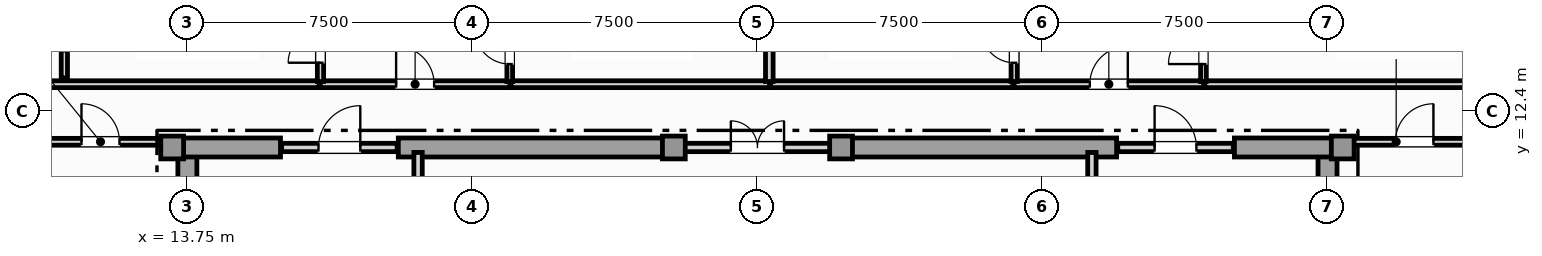
"""IFC4 building model, lengths in metres.
Left out: names, types, materials, properties, quantities, classifications, styles, units other than length and angle.
Written with IfcOpenShell. Run it as: python <this file> out.ifc"""

import sys

from ifc_helpers import new_model, si_unit, direction, frame, frame_2d, origin, origin_2d, place, context, subcontext, project, spatial, rectangle, extrude, element, fill, save


model = new_model("IFC4")
c1 = context("Model", 3, precision=1e-05, world=origin(), true_north=direction((0.0, 1.0)))
c2 = subcontext(c1, "Body", "Model", "MODEL_VIEW")
j1 = project(units=[si_unit("LENGTHUNIT", "METRE"), si_unit("PLANEANGLEUNIT", "RADIAN")], contexts=[c1])
p1 = place(None, origin())
s1 = spatial("IfcSite", under=j1, at=p1, CompositionType="ELEMENT")
p2 = place(p1, origin())
s2 = spatial("IfcBuilding", under=s1, at=p2, CompositionType="ELEMENT")
p3 = place(p2, frame((0.0, 0.0, 353.45)))
s3 = spatial("IfcBuildingStorey", under=s2, at=p3, CompositionType="ELEMENT", Elevation=353.45)
for number, where, z_axis, x_axis in (
    (1, (13.75, 0.92, 0.0), (0.0, 0.0, 1.0), (0.0, 1.0, 0.0)),
    (2, (43.75, 0.92, 0.0), (0.0, 0.0, 1.0), (0.0, 1.0, 0.0)),
):
    element("IfcWall", number, at=place(p3, frame(where, z_axis=z_axis, x_axis=x_axis)), inside=s3, PredefinedType="SHEAR", context=c2, shape_type="SweptSolid", body=[
        extrude(rectangle(XDim=10.53, YDim=0.5, at=frame_2d((5.265, 0.0))), origin(), (0.0, 0.0, 1.0), 4.14),
    ])
p4 = place(p3, frame((13.25, 11.45, 0.0), z_axis=(0.0, 0.0, 1.0), x_axis=(1.0, 0.0, 0.0)))
e3 = element("IfcWall", 3, at=p4, inside=s3, PredefinedType="SHEAR", context=c2, shape_type="SweptSolid", body=[
    extrude(rectangle(XDim=2.95, YDim=0.5, at=frame_2d((1.475, 0.0))), origin(), (0.0, 0.0, 1.0), 4.14),
])
for number, where, z_axis, x_axis in (
    (4, (19.3, 11.45, 0.0), (0.0, 0.0, 1.0), (1.0, 0.0, 0.0)),
    (5, (30.9, 11.45, 0.0), (0.0, 0.0, 1.0), (1.0, 0.0, 0.0)),
):
    element("IfcWall", number, at=place(p3, frame(where, z_axis=z_axis, x_axis=x_axis)), inside=s3, PredefinedType="SHEAR", context=c2, shape_type="SweptSolid", body=[
        extrude(rectangle(XDim=7.3, YDim=0.5, at=frame_2d((3.65, 0.0))), origin(), (0.0, 0.0, 1.0), 4.14),
    ])
p5 = place(p3, frame((41.3, 11.45, 0.0), z_axis=(0.0, 0.0, 1.0), x_axis=(1.0, 0.0, 0.0)))
e6 = element("IfcWall", 6, at=p5, inside=s3, PredefinedType="SHEAR", context=c2, shape_type="SweptSolid", body=[
    extrude(rectangle(XDim=2.95, YDim=0.5, at=frame_2d((1.475, 0.0))), origin(), (0.0, 0.0, 1.0), 4.14),
])
for number, where, z_axis, x_axis in (
    (7, (13.35, 11.45, 0.0), (0.0, 0.0, 1.0), (1.0, 0.0, 0.0)),
    (8, (44.15, 11.45, 0.0), (0.0, 0.0, 1.0), (1.0, 0.0, 0.0)),
    (9, (26.55, 11.45, 0.0), (0.0, 0.0, 1.0), (1.0, 0.0, 0.0)),
    (10, (30.95, 11.45, 0.0), (0.0, 0.0, 1.0), (1.0, 0.0, 0.0)),
):
    element("IfcColumn", number, at=place(p3, frame(where, z_axis=z_axis, x_axis=x_axis)), inside=s3, PredefinedType="COLUMN", context=c2, shape_type="SweptSolid", body=[
        extrude(rectangle(XDim=0.6, YDim=0.6, at=origin_2d()), origin(), (0.0, 0.0, 1.0), 4.4),
    ])
p6 = place(p3, frame((19.82, 8.52, 0.0), z_axis=(0.0, 0.0, 1.0), x_axis=(0.0, 1.0, 0.0)))
e11 = element("IfcWall", 11, at=p6, inside=s3, PredefinedType="SOLIDWALL", context=c2, shape_type="SweptSolid", body=[
    extrude(rectangle(XDim=2.8, YDim=0.22, at=frame_2d((1.4, 0.0))), origin(), (0.0, 0.0, 1.0), 3.595),
])
p7 = place(p6, frame((0.85, 0.0, 0.0)))
e12 = element("IfcOpeningElement", 12, at=p7, cuts=e11, PredefinedType="OPENING", context=c2, shape_type="SweptSolid", body=[
    extrude(rectangle(XDim=1.1, YDim=2.2, at=frame_2d((0.55, 1.1))), frame((0.0, 0.12, 0.0), z_axis=(0.0, -1.0, 0.0), x_axis=(1.0, 0.0, 0.0)), (0.0, 0.0, 1.0), 0.24),
])
p8 = place(p3, frame((37.55, 8.52, 0.0), z_axis=(0.0, 0.0, 1.0), x_axis=(0.0, 1.0, 0.0)))
e13 = element("IfcWall", 13, at=p8, inside=s3, PredefinedType="SOLIDWALL", context=c2, shape_type="SweptSolid", body=[
    extrude(rectangle(XDim=2.8, YDim=0.22, at=frame_2d((1.4, 0.0))), origin(), (0.0, 0.0, 1.0), 3.595),
])
p9 = place(p8, frame((0.85, 0.0, 0.0)))
e14 = element("IfcOpeningElement", 14, at=p9, cuts=e13, PredefinedType="OPENING", context=c2, shape_type="SweptSolid", body=[
    extrude(rectangle(XDim=1.1, YDim=2.2, at=frame_2d((0.55, 1.1))), frame((0.0, 0.12, 0.0), z_axis=(0.0, -1.0, 0.0), x_axis=(1.0, 0.0, 0.0)), (0.0, 0.0, 1.0), 0.24),
])
p10 = place(p3, frame((16.23, 11.45, 0.0), z_axis=(0.0, 0.0, 1.0), x_axis=(1.0, 0.0, 0.0)))
e15 = element("IfcWall", 15, at=p10, inside=s3, PredefinedType="SOLIDWALL", context=c2, shape_type="SweptSolid", body=[
    extrude(rectangle(XDim=3.04, YDim=0.22, at=frame_2d((1.52, 0.0))), origin(), (0.0, 0.0, 1.0), 4.14),
])
p11 = place(p10, frame((0.97, 0.0, 0.0)))
e16 = element("IfcOpeningElement", 16, at=p11, cuts=e15, PredefinedType="OPENING", context=c2, shape_type="SweptSolid", body=[
    extrude(rectangle(XDim=1.1, YDim=2.2, at=frame_2d((0.55, 1.1))), frame((0.0, 0.12, 0.0), z_axis=(0.0, -1.0, 0.0), x_axis=(1.0, 0.0, 0.0)), (0.0, 0.0, 1.0), 0.24),
])
p12 = place(p3, frame((26.63, 11.45, 0.0), z_axis=(0.0, 0.0, 1.0), x_axis=(1.0, 0.0, 0.0)))
e17 = element("IfcWall", 17, at=p12, inside=s3, PredefinedType="SOLIDWALL", context=c2, shape_type="SweptSolid", body=[
    extrude(rectangle(XDim=4.24, YDim=0.22, at=frame_2d((2.12, 0.0))), origin(), (0.0, 0.0, 1.0), 4.14),
])
p13 = place(p12, frame((1.42, 0.0, 0.0)))
e18 = element("IfcOpeningElement", 18, at=p13, cuts=e17, PredefinedType="OPENING", context=c2, shape_type="SweptSolid", body=[
    extrude(rectangle(XDim=1.4, YDim=2.2, at=frame_2d((0.7, 1.1))), frame((0.0, 0.12, 0.0), z_axis=(0.0, -1.0, 0.0), x_axis=(1.0, 0.0, 0.0)), (0.0, 0.0, 1.0), 0.24),
])
p14 = place(p3, frame((38.23, 11.45, 0.0), z_axis=(0.0, 0.0, 1.0), x_axis=(1.0, 0.0, 0.0)))
e19 = element("IfcWall", 19, at=p14, inside=s3, PredefinedType="SOLIDWALL", context=c2, shape_type="SweptSolid", body=[
    extrude(rectangle(XDim=3.04, YDim=0.22, at=frame_2d((1.52, 0.0))), origin(), (0.0, 0.0, 1.0), 4.14),
])
p15 = place(p14, frame((0.97, 0.0, 0.0)))
e20 = element("IfcOpeningElement", 20, at=p15, cuts=e19, PredefinedType="OPENING", context=c2, shape_type="SweptSolid", body=[
    extrude(rectangle(XDim=1.1, YDim=2.2, at=frame_2d((0.55, 1.1))), frame((0.0, 0.12, 0.0), z_axis=(0.0, -1.0, 0.0), x_axis=(1.0, 0.0, 0.0)), (0.0, 0.0, 1.0), 0.24),
])
p16 = place(p3, frame((9.782, 11.6, 0.0), z_axis=(0.0, 0.0, 1.0), x_axis=(1.0, 0.0, 0.0)))
e21 = element("IfcWall", 21, at=p16, inside=s3, PredefinedType="PARTITIONING", context=c2, shape_type="SweptSolid", body=[
    extrude(rectangle(XDim=3.363, YDim=0.18, at=frame_2d((1.681, 0.0))), origin(), (0.0, 0.0, 1.0), 4.14),
])
p17 = place(p16, frame((1.181, 0.0, 0.0)))
e22 = element("IfcOpeningElement", 22, at=p17, cuts=e21, PredefinedType="OPENING", context=c2, shape_type="SweptSolid", body=[
    extrude(rectangle(XDim=1.0, YDim=2.15, at=frame_2d((0.5, 1.075))), frame((0.0, 0.1, 0.0), z_axis=(0.0, -1.0, 0.0), x_axis=(1.0, 0.0, 0.0)), (0.0, 0.0, 1.0), 0.2),
])
p18 = place(p3, frame((44.355, 11.6, 0.0), z_axis=(0.0, 0.0, 1.0), x_axis=(1.0, 0.0, 0.0)))
e23 = element("IfcWall", 23, at=p18, inside=s3, PredefinedType="PARTITIONING", context=c2, shape_type="SweptSolid", body=[
    extrude(rectangle(XDim=3.363, YDim=0.18, at=frame_2d((1.681, 0.0))), origin(), (0.0, 0.0, 1.0), 4.14),
])
p19 = place(p18, frame((1.181, 0.0, 0.0)))
e24 = element("IfcOpeningElement", 24, at=p19, cuts=e23, PredefinedType="OPENING", context=c2, shape_type="SweptSolid", body=[
    extrude(rectangle(XDim=1.0, YDim=2.15, at=frame_2d((0.5, 1.075))), frame((0.0, 0.1, 0.0), z_axis=(0.0, -1.0, 0.0), x_axis=(1.0, 0.0, 0.0)), (0.0, 0.0, 1.0), 0.2),
])
p20 = place(p3, frame((17.248, 13.115, 0.0), z_axis=(0.0, 0.0, 1.0), x_axis=(1.0, 0.0, 0.0)))
e25 = element("IfcWall", 25, at=p20, inside=s3, PredefinedType="PARTITIONING", context=c2, shape_type="SweptSolid", body=[
    extrude(rectangle(XDim=4.99, YDim=0.18, at=frame_2d((2.495, 0.0))), origin(), (0.0, 0.0, 1.0), 4.14),
])
p21 = place(p20, frame((1.995, 0.0, 0.0)))
e26 = element("IfcOpeningElement", 26, at=p21, cuts=e25, PredefinedType="OPENING", context=c2, shape_type="SweptSolid", body=[
    extrude(rectangle(XDim=1.0, YDim=2.15, at=frame_2d((0.5, 1.075))), frame((0.0, 0.1, 0.0), z_axis=(0.0, -1.0, 0.0), x_axis=(1.0, 0.0, 0.0)), (0.0, 0.0, 1.0), 0.2),
])
p22 = place(p3, frame((9.782, 13.115, 0.0), z_axis=(0.0, 0.0, 1.0), x_axis=(1.0, 0.0, 0.0)))
e27 = element("IfcWall", 27, at=p22, inside=s3, PredefinedType="PARTITIONING", context=c2, shape_type="SweptSolid", body=[
    extrude(rectangle(XDim=7.435, YDim=0.18, at=frame_2d((3.718, 0.0))), origin(), (0.0, 0.0, 1.0), 4.14),
])
p23 = place(p3, frame((22.268, 13.115, 0.0), z_axis=(0.0, 0.0, 1.0), x_axis=(1.0, 0.0, 0.0)))
e28 = element("IfcWall", 28, at=p23, inside=s3, PredefinedType="PARTITIONING", context=c2, shape_type="SweptSolid", body=[
    extrude(rectangle(XDim=6.8, YDim=0.18, at=frame_2d((3.4, 0.0))), origin(), (0.0, 0.0, 1.0), 4.14),
])
p24 = place(p3, frame((35.5, 13.115, 0.0), z_axis=(0.0, 0.0, 1.0), x_axis=(1.0, 0.0, 0.0)))
e29 = element("IfcWall", 29, at=p24, inside=s3, PredefinedType="PARTITIONING", context=c2, shape_type="SweptSolid", body=[
    extrude(rectangle(XDim=4.99, YDim=0.18, at=frame_2d((2.495, 0.0))), origin(), (0.0, 0.0, 1.0), 4.14),
])
p25 = place(p24, frame((1.995, 0.0, 0.0)))
e30 = element("IfcOpeningElement", 30, at=p25, cuts=e29, PredefinedType="OPENING", context=c2, shape_type="SweptSolid", body=[
    extrude(rectangle(XDim=1.0, YDim=2.15, at=frame_2d((0.5, 1.075))), frame((0.0, 0.1, 0.0), z_axis=(0.0, -1.0, 0.0), x_axis=(1.0, 0.0, 0.0)), (0.0, 0.0, 1.0), 0.2),
])
p26 = place(p3, frame((29.097, 13.115, 0.0), z_axis=(0.0, 0.0, 1.0), x_axis=(1.0, 0.0, 0.0)))
e31 = element("IfcWall", 31, at=p26, inside=s3, PredefinedType="PARTITIONING", context=c2, shape_type="SweptSolid", body=[
    extrude(rectangle(XDim=6.373, YDim=0.18, at=frame_2d((3.187, 0.0))), origin(), (0.0, 0.0, 1.0), 4.14),
])
p27 = place(p3, frame((40.521, 13.115, 0.0), z_axis=(0.0, 0.0, 1.0), x_axis=(1.0, 0.0, 0.0)))
e32 = element("IfcWall", 32, at=p27, inside=s3, PredefinedType="PARTITIONING", context=c2, shape_type="SweptSolid", body=[
    extrude(rectangle(XDim=7.197, YDim=0.18, at=frame_2d((3.599, 0.0))), origin(), (0.0, 0.0, 1.0), 4.14),
])
p28 = place(p3, frame((17.252, 13.185, 0.0), z_axis=(0.0, 0.0, 1.0), x_axis=(0.0, 1.0, 0.0)))
e33 = element("IfcWall", 33, at=p28, inside=s3, PredefinedType="PLUMBINGWALL", context=c2, shape_type="SweptSolid", body=[
    extrude(rectangle(XDim=1.84, YDim=0.165, at=frame_2d((0.92, 0.0))), origin(), (0.0, 0.0, 1.0), 4.14),
])
p29 = place(p28, frame((0.495, 0.0, 0.0)))
e34 = element("IfcOpeningElement", 34, at=p29, cuts=e33, PredefinedType="OPENING", context=c2, shape_type="SweptSolid", body=[
    extrude(rectangle(XDim=0.85, YDim=2.1, at=frame_2d((0.425, 1.05))), frame((0.0, 0.093, 0.0), z_axis=(0.0, -1.0, 0.0), x_axis=(1.0, 0.0, 0.0)), (0.0, 0.0, 1.0), 0.185),
])
p30 = place(p3, frame((22.232, 13.185, 0.0), z_axis=(0.0, 0.0, 1.0), x_axis=(0.0, 1.0, 0.0)))
e35 = element("IfcWall", 35, at=p30, inside=s3, PredefinedType="PARTITIONING", context=c2, shape_type="SweptSolid", body=[
    extrude(rectangle(XDim=1.84, YDim=0.15, at=frame_2d((0.92, 0.0))), origin(), (0.0, 0.0, 1.0), 4.14),
])
p31 = place(p30, frame((0.46, 0.0, 0.0)))
e36 = element("IfcOpeningElement", 36, at=p31, cuts=e35, PredefinedType="OPENING", context=c2, shape_type="SweptSolid", body=[
    extrude(rectangle(XDim=0.92, YDim=2.1, at=frame_2d((0.46, 1.05))), frame((0.0, 0.085, 0.0), z_axis=(0.0, -1.0, 0.0), x_axis=(1.0, 0.0, 0.0)), (0.0, 0.0, 1.0), 0.17),
])
p32 = place(p3, frame((29.062, 13.185, 0.0), z_axis=(0.0, 0.0, 1.0), x_axis=(0.0, 1.0, 0.0)))
e37 = element("IfcWall", 37, at=p32, inside=s3, PredefinedType="PARTITIONING", context=c2, shape_type="SweptSolid", body=[
    extrude(rectangle(XDim=1.84, YDim=0.2, at=frame_2d((0.92, 0.0))), origin(), (0.0, 0.0, 1.0), 4.14),
])
p33 = place(p3, frame((35.506, 13.185, 0.0), z_axis=(0.0, 0.0, 1.0), x_axis=(0.0, 1.0, 0.0)))
e38 = element("IfcWall", 38, at=p33, inside=s3, PredefinedType="PLUMBINGWALL", context=c2, shape_type="SweptSolid", body=[
    extrude(rectangle(XDim=1.84, YDim=0.165, at=frame_2d((0.92, 0.0))), origin(), (0.0, 0.0, 1.0), 4.14),
])
p34 = place(p33, frame((0.495, 0.0, 0.0)))
e39 = element("IfcOpeningElement", 39, at=p34, cuts=e38, PredefinedType="OPENING", context=c2, shape_type="SweptSolid", body=[
    extrude(rectangle(XDim=0.85, YDim=2.1, at=frame_2d((0.425, 1.05))), frame((0.0, 0.093, 0.0), z_axis=(0.0, -1.0, 0.0), x_axis=(1.0, 0.0, 0.0)), (0.0, 0.0, 1.0), 0.185),
])
p35 = place(p3, frame((40.486, 13.185, 0.0), z_axis=(0.0, 0.0, 1.0), x_axis=(0.0, 1.0, 0.0)))
e40 = element("IfcWall", 40, at=p35, inside=s3, PredefinedType="PARTITIONING", context=c2, shape_type="SweptSolid", body=[
    extrude(rectangle(XDim=1.84, YDim=0.15, at=frame_2d((0.92, 0.0))), origin(), (0.0, 0.0, 1.0), 4.14),
])
p36 = place(p35, frame((0.46, 0.0, 0.0)))
e41 = element("IfcOpeningElement", 41, at=p36, cuts=e40, PredefinedType="OPENING", context=c2, shape_type="SweptSolid", body=[
    extrude(rectangle(XDim=0.92, YDim=2.1, at=frame_2d((0.46, 1.05))), frame((0.0, 0.085, 0.0), z_axis=(0.0, -1.0, 0.0), x_axis=(1.0, 0.0, 0.0)), (0.0, 0.0, 1.0), 0.17),
])
p37 = place(p3, frame((10.513, 13.28, 0.0), z_axis=(0.0, 0.0, 1.0), x_axis=(0.0, 1.0, 0.0)))
e42 = element("IfcWall", 42, at=p37, inside=s3, PredefinedType="PLUMBINGWALL", context=c2, shape_type="SweptSolid", body=[
    extrude(rectangle(XDim=1.575, YDim=0.165, at=frame_2d((0.788, 0.0))), origin(), (0.0, 0.0, 1.0), 4.14),
])
p38 = place(p11, origin())
e43 = element("IfcDoor", 43, at=p38, inside=s3, OperationType="SINGLE_SWING_RIGHT", PredefinedType="DOOR", context=c2, shape_type="SweptSolid", body=[
    extrude(rectangle(XDim=1.1, YDim=2.2, at=frame_2d((0.55, 1.1))), frame((0.0, 0.025, 0.0), z_axis=(0.0, -1.0, 0.0), x_axis=(1.0, 0.0, 0.0)), (0.0, 0.0, 1.0), 0.05),
])
fill(e16, e43)
p39 = place(p13, origin())
e44 = element("IfcDoor", 44, at=p39, inside=s3, OperationType="DOUBLE_DOOR_SINGLE_SWING", PredefinedType="DOOR", context=c2, shape_type="SweptSolid", body=[
    extrude(rectangle(XDim=1.4, YDim=2.2, at=frame_2d((0.7, 1.1))), frame((0.0, 0.025, 0.0), z_axis=(0.0, -1.0, 0.0), x_axis=(1.0, 0.0, 0.0)), (0.0, 0.0, 1.0), 0.05),
])
fill(e18, e44)
p40 = place(p15, origin())
e45 = element("IfcDoor", 45, at=p40, inside=s3, OperationType="SINGLE_SWING_LEFT", PredefinedType="DOOR", context=c2, shape_type="SweptSolid", body=[
    extrude(rectangle(XDim=1.1, YDim=2.2, at=frame_2d((0.55, 1.1))), frame((0.0, 0.025, 0.0), z_axis=(0.0, -1.0, 0.0), x_axis=(1.0, 0.0, 0.0)), (0.0, 0.0, 1.0), 0.05),
])
fill(e20, e45)
p41 = place(p17, origin())
e46 = element("IfcDoor", 46, at=p41, inside=s3, OperationType="SINGLE_SWING_LEFT", PredefinedType="DOOR", context=c2, shape_type="SweptSolid", body=[
    extrude(rectangle(XDim=1.0, YDim=2.15, at=frame_2d((0.5, 1.075))), frame((0.0, 0.025, 0.0), z_axis=(0.0, -1.0, 0.0), x_axis=(1.0, 0.0, 0.0)), (0.0, 0.0, 1.0), 0.05),
])
fill(e22, e46)
p42 = place(p19, origin())
e47 = element("IfcDoor", 47, at=p42, inside=s3, OperationType="SINGLE_SWING_RIGHT", PredefinedType="DOOR", context=c2, shape_type="SweptSolid", body=[
    extrude(rectangle(XDim=1.0, YDim=2.15, at=frame_2d((0.5, 1.075))), frame((0.0, 0.025, 0.0), z_axis=(0.0, -1.0, 0.0), x_axis=(1.0, 0.0, 0.0)), (0.0, 0.0, 1.0), 0.05),
])
fill(e24, e47)
p43 = place(p21, origin())
e48 = element("IfcDoor", 48, at=p43, inside=s3, OperationType="SINGLE_SWING_LEFT", PredefinedType="DOOR", context=c2, shape_type="SweptSolid", body=[
    extrude(rectangle(XDim=1.0, YDim=2.15, at=frame_2d((0.5, 1.075))), frame((0.0, 0.025, 0.0), z_axis=(0.0, -1.0, 0.0), x_axis=(1.0, 0.0, 0.0)), (0.0, 0.0, 1.0), 0.05),
])
fill(e26, e48)
p44 = place(p25, origin())
e49 = element("IfcDoor", 49, at=p44, inside=s3, OperationType="SINGLE_SWING_RIGHT", PredefinedType="DOOR", context=c2, shape_type="SweptSolid", body=[
    extrude(rectangle(XDim=1.0, YDim=2.15, at=frame_2d((0.5, 1.075))), frame((0.0, 0.025, 0.0), z_axis=(0.0, -1.0, 0.0), x_axis=(1.0, 0.0, 0.0)), (0.0, 0.0, 1.0), 0.05),
])
fill(e30, e49)
p45 = place(p29, origin())
e50 = element("IfcDoor", 50, at=p45, inside=s3, OperationType="SINGLE_SWING_LEFT", PredefinedType="DOOR", context=c2, shape_type="SweptSolid", body=[
    extrude(rectangle(XDim=0.85, YDim=2.1, at=frame_2d((0.425, 1.05))), frame((0.0, 0.025, 0.0), z_axis=(0.0, -1.0, 0.0), x_axis=(1.0, 0.0, 0.0)), (0.0, 0.0, 1.0), 0.05),
])
fill(e34, e50)
p46 = place(p31, origin())
e51 = element("IfcDoor", 51, at=p46, inside=s3, OperationType="SINGLE_SWING_RIGHT", PredefinedType="DOOR", context=c2, shape_type="SweptSolid", body=[
    extrude(rectangle(XDim=0.92, YDim=2.1, at=frame_2d((0.46, 1.05))), frame((0.0, 0.025, 0.0), z_axis=(0.0, -1.0, 0.0), x_axis=(1.0, 0.0, 0.0)), (0.0, 0.0, 1.0), 0.05),
])
fill(e36, e51)
p47 = place(p34, origin())
e52 = element("IfcDoor", 52, at=p47, inside=s3, OperationType="SINGLE_SWING_RIGHT", PredefinedType="DOOR", context=c2, shape_type="SweptSolid", body=[
    extrude(rectangle(XDim=0.85, YDim=2.1, at=frame_2d((0.425, 1.05))), frame((0.0, 0.025, 0.0), z_axis=(0.0, -1.0, 0.0), x_axis=(1.0, 0.0, 0.0)), (0.0, 0.0, 1.0), 0.05),
])
fill(e39, e52)
p48 = place(p36, origin())
e53 = element("IfcDoor", 53, at=p48, inside=s3, OperationType="SINGLE_SWING_LEFT", PredefinedType="DOOR", context=c2, shape_type="SweptSolid", body=[
    extrude(rectangle(XDim=0.92, YDim=2.1, at=frame_2d((0.46, 1.05))), frame((0.0, 0.025, 0.0), z_axis=(0.0, -1.0, 0.0), x_axis=(1.0, 0.0, 0.0)), (0.0, 0.0, 1.0), 0.05),
])
fill(e41, e53)
save(model, sys.argv[1])
